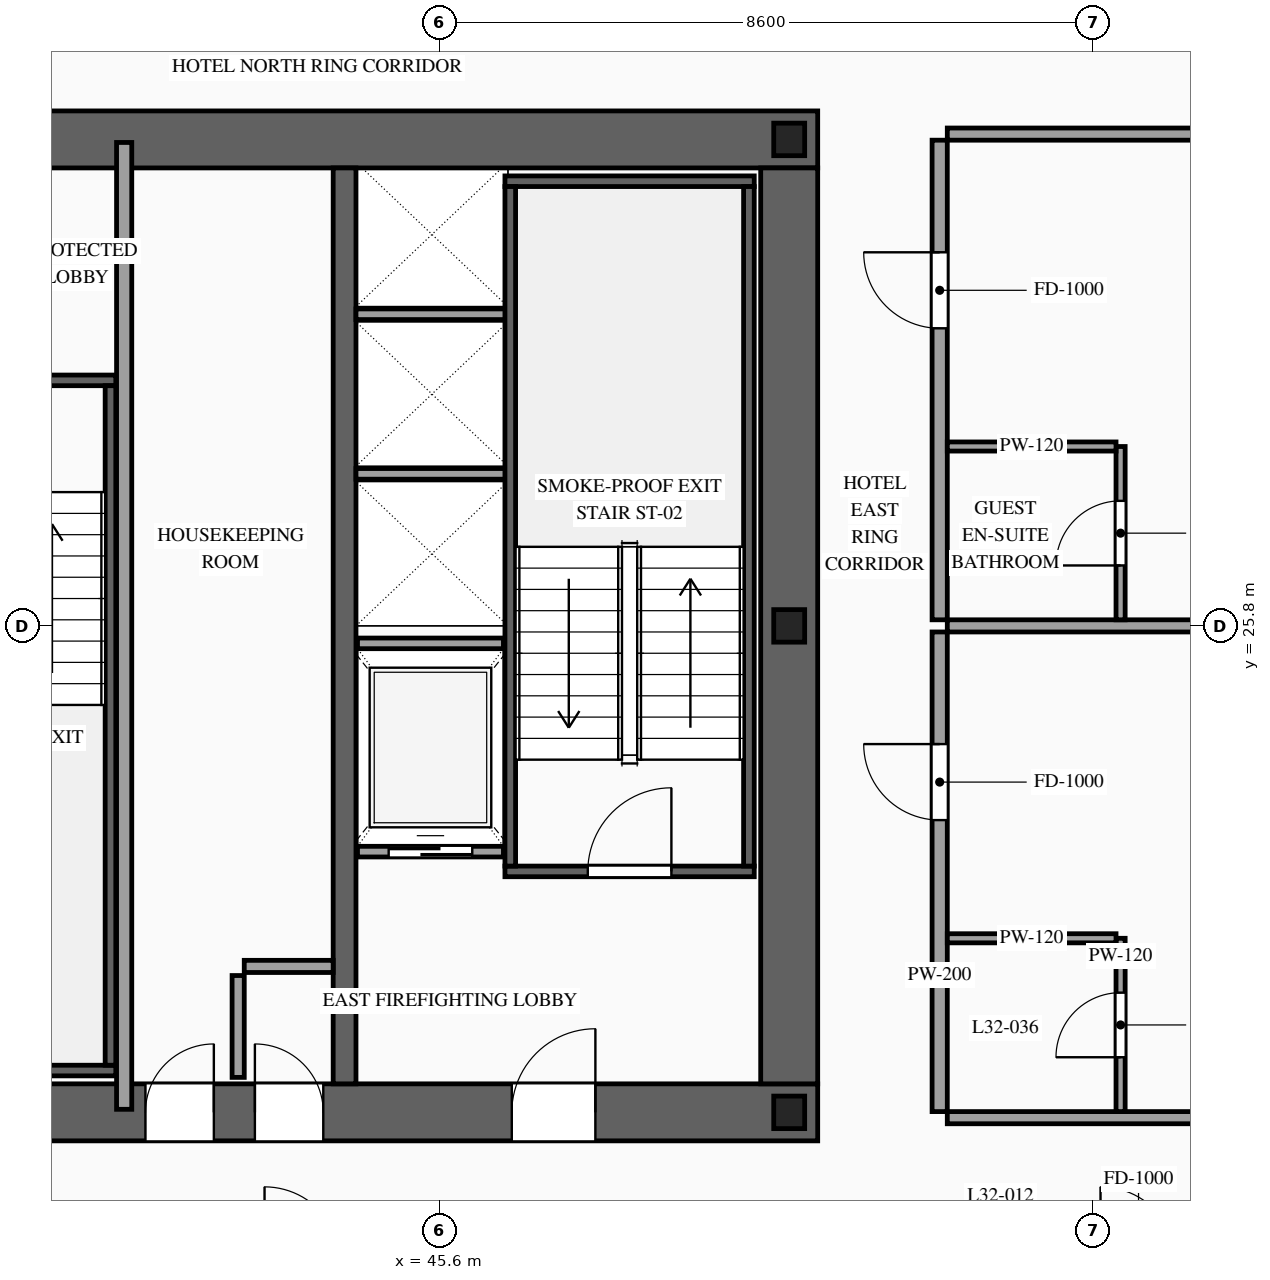
"""IFC4 building model, lengths in metres.
Left out: names, types, materials, properties, quantities, classifications, styles, units other than length and angle.
Written with IfcOpenShell. Run it as: python <this file> out.ifc"""

import sys

from ifc_helpers import new_model, si_unit, direction, frame, frame_2d, origin, origin_2d, place, context, subcontext, project, spatial, rectangle, i_section, extrude, source, transform, mapped, element, fill, save


model = new_model("IFC4")
c1 = context("Model", 3, precision=1e-05, world=origin(), true_north=direction((0.0, 1.0)))
c2 = subcontext(c1, "Body", "Model", "MODEL_VIEW")
j1 = project(units=[si_unit("LENGTHUNIT", "METRE"), si_unit("PLANEANGLEUNIT", "RADIAN")], contexts=[c1])
p1 = place(None, origin())
s1 = spatial("IfcSite", under=j1, at=p1, CompositionType="ELEMENT")
p2 = place(p1, origin())
s2 = spatial("IfcBuilding", under=s1, at=p2, CompositionType="ELEMENT")
p3 = place(p2, frame((0.0, 0.0, 122.6)))
s3 = spatial("IfcBuildingStorey", under=s2, at=p3, CompositionType="ELEMENT", Elevation=122.6)
p4 = place(p3, frame((23.425, 19.4, 0.0), z_axis=(0.0, 0.0, 1.0), x_axis=(1.0, 0.0, 0.0)))
e1 = element("IfcWall", 1, at=p4, inside=s3, PredefinedType="SHEAR", context=c2, shape_type="SweptSolid", body=[
    extrude(rectangle(XDim=27.15, YDim=0.75, at=frame_2d((13.575, 0.0))), origin(), (0.0, 0.0, 1.0), 3.6),
])
p5 = place(p4, frame((2.025, 0.0, 0.0)))
e2 = element("IfcOpeningElement", 2, at=p5, cuts=e1, PredefinedType="OPENING", context=c2, shape_type="SweptSolid", body=[
    extrude(rectangle(XDim=1.1, YDim=2.2, at=frame_2d((0.55, 1.1))), frame((0.0, 0.39, 0.0), z_axis=(0.0, -1.0, 0.0), x_axis=(1.0, 0.0, 0.0)), (0.0, 0.0, 1.0), 0.78),
])
p6 = place(p4, frame((9.925, 0.0, 0.0)))
e3 = element("IfcOpeningElement", 3, at=p6, cuts=e1, PredefinedType="OPENING", context=c2, shape_type="SweptSolid", body=[
    extrude(rectangle(XDim=1.1, YDim=2.2, at=frame_2d((0.55, 1.1))), frame((0.0, 0.39, 0.0), z_axis=(0.0, -1.0, 0.0), x_axis=(1.0, 0.0, 0.0)), (0.0, 0.0, 1.0), 0.78),
])
p7 = place(p4, frame((23.125, 0.0, 0.0)))
e4 = element("IfcOpeningElement", 4, at=p7, cuts=e1, PredefinedType="OPENING", context=c2, shape_type="SweptSolid", body=[
    extrude(rectangle(XDim=1.1, YDim=2.2, at=frame_2d((0.55, 1.1))), frame((0.0, 0.39, 0.0), z_axis=(0.0, -1.0, 0.0), x_axis=(1.0, 0.0, 0.0)), (0.0, 0.0, 1.0), 0.78),
])
p8 = place(p4, frame((19.745, 0.0, 0.0)))
e5 = element("IfcOpeningElement", 5, at=p8, cuts=e1, PredefinedType="OPENING", context=c2, shape_type="SweptSolid", body=[
    extrude(rectangle(XDim=0.9, YDim=2.15, at=frame_2d((0.45, 1.075))), frame((0.0, 0.39, 0.0), z_axis=(0.0, -1.0, 0.0), x_axis=(1.0, 0.0, 0.0)), (0.0, 0.0, 1.0), 0.78),
])
p9 = place(p4, frame((18.305, 0.0, 0.0)))
e6 = element("IfcOpeningElement", 6, at=p9, cuts=e1, PredefinedType="OPENING", context=c2, shape_type="SweptSolid", body=[
    extrude(rectangle(XDim=0.9, YDim=2.15, at=frame_2d((0.45, 1.075))), frame((0.0, 0.39, 0.0), z_axis=(0.0, -1.0, 0.0), x_axis=(1.0, 0.0, 0.0)), (0.0, 0.0, 1.0), 0.78),
])
p10 = place(p3, frame((23.425, 32.2, 0.0), z_axis=(0.0, 0.0, 1.0), x_axis=(1.0, 0.0, 0.0)))
e7 = element("IfcWall", 7, at=p10, inside=s3, PredefinedType="SHEAR", context=c2, shape_type="SweptSolid", body=[
    extrude(rectangle(XDim=27.15, YDim=0.75, at=frame_2d((13.575, 0.0))), origin(), (0.0, 0.0, 1.0), 3.6),
])
p11 = place(p10, frame((4.645, 0.0, 0.0)))
e8 = element("IfcOpeningElement", 8, at=p11, cuts=e7, PredefinedType="OPENING", context=c2, shape_type="SweptSolid", body=[
    extrude(rectangle(XDim=0.9, YDim=2.15, at=frame_2d((0.45, 1.075))), frame((0.0, 0.39, 0.0), z_axis=(0.0, -1.0, 0.0), x_axis=(1.0, 0.0, 0.0)), (0.0, 0.0, 1.0), 0.78),
])
p12 = place(p10, frame((9.925, 0.0, 0.0)))
e9 = element("IfcOpeningElement", 9, at=p12, cuts=e7, PredefinedType="OPENING", context=c2, shape_type="SweptSolid", body=[
    extrude(rectangle(XDim=1.1, YDim=2.2, at=frame_2d((0.55, 1.1))), frame((0.0, 0.39, 0.0), z_axis=(0.0, -1.0, 0.0), x_axis=(1.0, 0.0, 0.0)), (0.0, 0.0, 1.0), 0.78),
])
p13 = place(p10, frame((15.775, 0.0, 0.0)))
e10 = element("IfcOpeningElement", 10, at=p13, cuts=e7, PredefinedType="OPENING", context=c2, shape_type="SweptSolid", body=[
    extrude(rectangle(XDim=1.1, YDim=2.2, at=frame_2d((0.55, 1.1))), frame((0.0, 0.39, 0.0), z_axis=(0.0, -1.0, 0.0), x_axis=(1.0, 0.0, 0.0)), (0.0, 0.0, 1.0), 0.78),
])
m1 = source(origin(), c2, "Body", "SweptSolid", [
    extrude(rectangle(XDim=12.05, YDim=0.75, at=frame_2d((6.025, 0.0))), origin(), (0.0, 0.0, 1.0), 3.6),
])
p14 = place(p3, frame((50.2, 19.775, 0.0), z_axis=(0.0, 0.0, 1.0), x_axis=(0.0, 1.0, 0.0)))
e11 = element("IfcWall", 11, at=p14, inside=s3, PredefinedType="SHEAR", context=c2, shape_type="MappedRepresentation", body=[
    mapped(m1, transform((0.0, 0.0, 0.0), scale=1.0)),
])
m2 = source(origin(), c2, "Body", "SweptSolid", [
    extrude(rectangle(XDim=12.05, YDim=0.3, at=frame_2d((6.025, 0.0))), origin(), (0.0, 0.0, 1.0), 3.6),
])
p15 = place(p3, frame((44.35, 19.775, 0.0), z_axis=(0.0, 0.0, 1.0), x_axis=(0.0, 1.0, 0.0)))
e12 = element("IfcWall", 12, at=p15, inside=s3, PredefinedType="SOLIDWALL", context=c2, shape_type="MappedRepresentation", body=[
    mapped(m2, transform((0.0, 0.0, 0.0), scale=1.0)),
])
m3 = source(origin(), c2, "Body", "SweptSolid", [
    extrude(i_section(OverallWidth=0.407, OverallDepth=0.428, WebThickness=0.02, FlangeThickness=0.035, at=origin_2d()), origin(), (0.0, 0.0, 1.0), 3.6),
])
for number, where, z_axis, x_axis in (
    (13, (50.2, 19.4, 0.0), (0.0, 0.0, 1.0), (1.0, 0.0, 0.0)),
    (14, (50.2, 25.8, 0.0), (0.0, 0.0, 1.0), (1.0, 0.0, 0.0)),
    (15, (50.2, 32.2, 0.0), (0.0, 0.0, 1.0), (1.0, 0.0, 0.0)),
):
    element("IfcColumn", number, at=place(p3, frame(where, z_axis=z_axis, x_axis=x_axis)), inside=s3, PredefinedType="COLUMN", context=c2, shape_type="MappedRepresentation", body=[
        mapped(m3, transform((0.0, 0.0, 0.0), scale=1.0)),
    ])
p16 = place(p3, frame((44.52, 22.83, 0.0), z_axis=(0.0, 0.0, 1.0), x_axis=(1.0, 0.0, 0.0)))
e16 = element("IfcWall", 16, at=p16, inside=s3, PredefinedType="SOLIDWALL", context=c2, shape_type="SweptSolid", body=[
    extrude(rectangle(XDim=1.92, YDim=0.14, at=frame_2d((0.96, 0.0))), origin(), (0.0, 0.0, 1.0), 3.38),
])
p17 = place(p16, frame((0.41, 0.0, 0.0)))
e17 = element("IfcOpeningElement", 17, at=p17, cuts=e16, PredefinedType="OPENING", context=c2, shape_type="SweptSolid", body=[
    extrude(rectangle(XDim=1.1, YDim=2.2, at=frame_2d((0.55, 1.1))), frame((0.0, 0.085, 0.0), z_axis=(0.0, -1.0, 0.0), x_axis=(1.0, 0.0, 0.0)), (0.0, 0.0, 1.0), 0.17),
])
m4 = source(origin(), c2, "Body", "SweptSolid", [
    extrude(rectangle(XDim=1.92, YDim=0.14, at=frame_2d((0.96, 0.0))), origin(), (0.0, 0.0, 1.0), 3.38),
])
p18 = place(p3, frame((44.52, 25.57, 0.0), z_axis=(0.0, 0.0, 1.0), x_axis=(1.0, 0.0, 0.0)))
e18 = element("IfcWall", 18, at=p18, inside=s3, PredefinedType="SOLIDWALL", context=c2, shape_type="MappedRepresentation", body=[
    mapped(m4, transform((0.0, 0.0, 0.0), scale=1.0)),
])
m5 = source(origin(), c2, "Body", "SweptSolid", [
    extrude(rectangle(XDim=2.0, YDim=0.14, at=frame_2d((1.0, 0.0))), origin(), (0.0, 0.0, 1.0), 3.38),
])
for number, where, z_axis, x_axis in (
    (19, (44.5, 27.8, 0.0), (0.0, 0.0, 1.0), (1.0, 0.0, 0.0)),
    (20, (44.5, 29.9, 0.0), (0.0, 0.0, 1.0), (1.0, 0.0, 0.0)),
):
    element("IfcWall", number, at=place(p3, frame(where, z_axis=z_axis, x_axis=x_axis)), inside=s3, PredefinedType="SOLIDWALL", context=c2, shape_type="MappedRepresentation", body=[
        mapped(m5, transform((0.0, 0.0, 0.0), scale=1.0)),
    ])
p19 = place(p3, frame((46.46, 22.57, 0.0), z_axis=(0.0, 0.0, 1.0), x_axis=(1.0, 0.0, 0.0)))
e21 = element("IfcWall", 21, at=p19, inside=s3, PredefinedType="SOLIDWALL", context=c2, shape_type="SweptSolid", body=[
    extrude(rectangle(XDim=3.28, YDim=0.14, at=frame_2d((1.64, 0.0))), origin(), (0.0, 0.0, 1.0), 3.38),
])
p20 = place(p19, frame((1.09, 0.0, 0.0)))
e22 = element("IfcOpeningElement", 22, at=p20, cuts=e21, PredefinedType="OPENING", context=c2, shape_type="SweptSolid", body=[
    extrude(rectangle(XDim=1.1, YDim=2.2, at=frame_2d((0.55, 1.1))), frame((0.0, 0.085, 0.0), z_axis=(0.0, -1.0, 0.0), x_axis=(1.0, 0.0, 0.0)), (0.0, 0.0, 1.0), 0.17),
])
m6 = source(origin(), c2, "Body", "SweptSolid", [
    extrude(rectangle(XDim=3.28, YDim=0.14, at=frame_2d((1.64, 0.0))), origin(), (0.0, 0.0, 1.0), 3.38),
])
p21 = place(p3, frame((46.46, 31.65, 0.0), z_axis=(0.0, 0.0, 1.0), x_axis=(1.0, 0.0, 0.0)))
e23 = element("IfcWall", 23, at=p21, inside=s3, PredefinedType="SOLIDWALL", context=c2, shape_type="MappedRepresentation", body=[
    mapped(m6, transform((0.0, 0.0, 0.0), scale=1.0)),
])
m7 = source(origin(), c2, "Body", "SweptSolid", [
    extrude(rectangle(XDim=8.94, YDim=0.14, at=frame_2d((4.47, 0.0))), origin(), (0.0, 0.0, 1.0), 3.38),
])
for number, where, z_axis, x_axis in (
    (24, (46.53, 22.64, 0.0), (0.0, 0.0, 1.0), (0.0, 1.0, 0.0)),
    (25, (49.67, 22.64, 0.0), (0.0, 0.0, 1.0), (0.0, 1.0, 0.0)),
):
    element("IfcWall", number, at=place(p3, frame(where, z_axis=z_axis, x_axis=x_axis)), inside=s3, PredefinedType="SOLIDWALL", context=c2, shape_type="MappedRepresentation", body=[
        mapped(m7, transform((0.0, 0.0, 0.0), scale=1.0)),
    ])
p22 = place(p3, frame((38.2, 29.03, 0.0), z_axis=(0.0, 0.0, 1.0), x_axis=(1.0, 0.0, 0.0)))
e26 = element("IfcWall", 26, at=p22, inside=s3, PredefinedType="SOLIDWALL", context=c2, shape_type="SweptSolid", body=[
    extrude(rectangle(XDim=3.14, YDim=0.14, at=frame_2d((1.57, 0.0))), origin(), (0.0, 0.0, 1.0), 3.38),
])
p23 = place(p22, frame((1.02, 0.0, 0.0)))
e27 = element("IfcOpeningElement", 27, at=p23, cuts=e26, PredefinedType="OPENING", context=c2, shape_type="SweptSolid", body=[
    extrude(rectangle(XDim=1.1, YDim=2.2, at=frame_2d((0.55, 1.1))), frame((0.0, 0.085, 0.0), z_axis=(0.0, -1.0, 0.0), x_axis=(1.0, 0.0, 0.0)), (0.0, 0.0, 1.0), 0.17),
])
m8 = source(origin(), c2, "Body", "SweptSolid", [
    extrude(rectangle(XDim=3.14, YDim=0.14, at=frame_2d((1.57, 0.0))), origin(), (0.0, 0.0, 1.0), 3.38),
])
p24 = place(p3, frame((38.2, 19.95, 0.0), z_axis=(0.0, 0.0, 1.0), x_axis=(1.0, 0.0, 0.0)))
e28 = element("IfcWall", 28, at=p24, inside=s3, PredefinedType="SOLIDWALL", context=c2, shape_type="MappedRepresentation", body=[
    mapped(m8, transform((0.0, 0.0, 0.0), scale=1.0)),
])
m9 = source(origin(), c2, "Body", "SweptSolid", [
    extrude(rectangle(XDim=8.94, YDim=0.14, at=frame_2d((4.47, 0.0))), origin(), (0.0, 0.0, 1.0), 3.38),
])
p25 = place(p3, frame((41.27, 20.02, 0.0), z_axis=(0.0, 0.0, 1.0), x_axis=(0.0, 1.0, 0.0)))
e29 = element("IfcWall", 29, at=p25, inside=s3, PredefinedType="SOLIDWALL", context=c2, shape_type="MappedRepresentation", body=[
    mapped(m9, transform((0.0, 0.0, 0.0), scale=1.0)),
])
m10 = source(origin(), c2, "Body", "SweptSolid", [
    extrude(rectangle(XDim=1.34, YDim=0.16, at=frame_2d((0.67, 0.0))), origin(), (0.0, 0.0, 1.0), 3.38),
])
p26 = place(p3, frame((42.95, 19.86, 0.0), z_axis=(0.0, 0.0, 1.0), x_axis=(0.0, 1.0, 0.0)))
e30 = element("IfcWall", 30, at=p26, inside=s3, PredefinedType="PARTITIONING", context=c2, shape_type="MappedRepresentation", body=[
    mapped(m10, transform((0.0, 0.0, 0.0), scale=1.0)),
])
m11 = source(origin(), c2, "Body", "SweptSolid", [
    extrude(rectangle(XDim=1.17, YDim=0.16, at=frame_2d((0.585, 0.0))), origin(), (0.0, 0.0, 1.0), 3.38),
])
p27 = place(p3, frame((43.03, 21.32, 0.0), z_axis=(0.0, 0.0, 1.0), x_axis=(1.0, 0.0, 0.0)))
e31 = element("IfcWall", 31, at=p27, inside=s3, PredefinedType="PARTITIONING", context=c2, shape_type="MappedRepresentation", body=[
    mapped(m11, transform((0.0, 0.0, 0.0), scale=1.0)),
])
m12 = source(origin(), c2, "Body", "SweptSolid", [
    extrude(rectangle(XDim=12.72, YDim=0.2, at=frame_2d((6.36, 0.0))), origin(), (0.0, 0.0, 1.0), 3.38),
])
p28 = place(p3, frame((41.45, 19.44, 0.0), z_axis=(0.0, 0.0, 1.0), x_axis=(0.0, 1.0, 0.0)))
e32 = element("IfcWall", 32, at=p28, inside=s3, PredefinedType="PARTITIONING", context=c2, shape_type="MappedRepresentation", body=[
    mapped(m12, transform((0.0, 0.0, 0.0), scale=1.0)),
])
p29 = place(p3, frame((52.18, 19.41, 0.0), z_axis=(0.0, 0.0, 1.0), x_axis=(0.0, 1.0, 0.0)))
e33 = element("IfcWall", 33, at=p29, inside=s3, PredefinedType="PARTITIONING", context=c2, shape_type="SweptSolid", body=[
    extrude(rectangle(XDim=6.31, YDim=0.2, at=frame_2d((3.155, 0.0))), origin(), (0.0, 0.0, 1.0), 3.38),
])
p30 = place(p29, frame((3.835, 0.0, 0.0)))
e34 = element("IfcOpeningElement", 34, at=p30, cuts=e33, PredefinedType="OPENING", context=c2, shape_type="SweptSolid", body=[
    extrude(rectangle(XDim=1.0, YDim=2.2, at=frame_2d((0.5, 1.1))), frame((0.0, 0.115, 0.0), z_axis=(0.0, -1.0, 0.0), x_axis=(1.0, 0.0, 0.0)), (0.0, 0.0, 1.0), 0.23),
])
m13 = source(origin(), c2, "Body", "SweptSolid", [
    extrude(rectangle(XDim=8.17, YDim=0.16, at=frame_2d((4.085, 0.0))), origin(), (0.0, 0.0, 1.0), 2.675),
])
p31 = place(p3, frame((52.28, 25.8, 0.0), z_axis=(0.0, 0.0, 1.0), x_axis=(1.0, 0.0, 0.0)))
e35 = element("IfcWall", 35, at=p31, inside=s3, PredefinedType="PARTITIONING", context=c2, shape_type="MappedRepresentation", body=[
    mapped(m13, transform((0.0, 0.0, 0.0), scale=1.0)),
])
m14 = source(origin(), c2, "Body", "SweptSolid", [
    extrude(rectangle(XDim=8.17, YDim=0.16, at=frame_2d((4.085, 0.0))), origin(), (0.0, 0.0, 1.0), 2.875),
])
p32 = place(p3, frame((52.28, 19.33, 0.0), z_axis=(0.0, 0.0, 1.0), x_axis=(1.0, 0.0, 0.0)))
e36 = element("IfcWall", 36, at=p32, inside=s3, PredefinedType="PARTITIONING", context=c2, shape_type="MappedRepresentation", body=[
    mapped(m14, transform((0.0, 0.0, 0.0), scale=1.0)),
])
p33 = place(p3, frame((54.56, 19.41, 0.0), z_axis=(0.0, 0.0, 1.0), x_axis=(0.0, 1.0, 0.0)))
e37 = element("IfcWall", 37, at=p33, inside=s3, PredefinedType="PARTITIONING", context=c2, shape_type="SweptSolid", body=[
    extrude(rectangle(XDim=2.28, YDim=0.12, at=frame_2d((1.14, 0.0))), origin(), (0.0, 0.0, 1.0), 3.38),
])
p34 = place(p33, frame((0.715, 0.0, 0.0)))
e38 = element("IfcOpeningElement", 38, at=p34, cuts=e37, PredefinedType="OPENING", context=c2, shape_type="SweptSolid", body=[
    extrude(rectangle(XDim=0.85, YDim=2.1, at=frame_2d((0.425, 1.05))), frame((0.0, 0.075, 0.0), z_axis=(0.0, -1.0, 0.0), x_axis=(1.0, 0.0, 0.0)), (0.0, 0.0, 1.0), 0.15),
])
m15 = source(origin(), c2, "Body", "SweptSolid", [
    extrude(rectangle(XDim=2.22, YDim=0.12, at=frame_2d((1.11, 0.0))), origin(), (0.0, 0.0, 1.0), 3.38),
])
p35 = place(p3, frame((52.28, 21.69, 0.0), z_axis=(0.0, 0.0, 1.0), x_axis=(1.0, 0.0, 0.0)))
e39 = element("IfcWall", 39, at=p35, inside=s3, PredefinedType="PARTITIONING", context=c2, shape_type="MappedRepresentation", body=[
    mapped(m15, transform((0.0, 0.0, 0.0), scale=1.0)),
])
p36 = place(p3, frame((52.18, 25.88, 0.0), z_axis=(0.0, 0.0, 1.0), x_axis=(0.0, 1.0, 0.0)))
e40 = element("IfcWall", 40, at=p36, inside=s3, PredefinedType="PARTITIONING", context=c2, shape_type="SweptSolid", body=[
    extrude(rectangle(XDim=6.31, YDim=0.2, at=frame_2d((3.155, 0.0))), origin(), (0.0, 0.0, 1.0), 3.38),
])
p37 = place(p36, frame((3.835, 0.0, 0.0)))
e41 = element("IfcOpeningElement", 41, at=p37, cuts=e40, PredefinedType="OPENING", context=c2, shape_type="SweptSolid", body=[
    extrude(rectangle(XDim=1.0, YDim=2.2, at=frame_2d((0.5, 1.1))), frame((0.0, 0.115, 0.0), z_axis=(0.0, -1.0, 0.0), x_axis=(1.0, 0.0, 0.0)), (0.0, 0.0, 1.0), 0.23),
])
p38 = place(p3, frame((52.28, 32.27, 0.0), z_axis=(0.0, 0.0, 1.0), x_axis=(1.0, 0.0, 0.0)))
e42 = element("IfcWall", 42, at=p38, inside=s3, PredefinedType="PARTITIONING", context=c2, shape_type="MappedRepresentation", body=[
    mapped(m14, transform((0.0, 0.0, 0.0), scale=1.0)),
])
p39 = place(p3, frame((54.56, 25.88, 0.0), z_axis=(0.0, 0.0, 1.0), x_axis=(0.0, 1.0, 0.0)))
e43 = element("IfcWall", 43, at=p39, inside=s3, PredefinedType="PARTITIONING", context=c2, shape_type="SweptSolid", body=[
    extrude(rectangle(XDim=2.28, YDim=0.12, at=frame_2d((1.14, 0.0))), origin(), (0.0, 0.0, 1.0), 3.38),
])
p40 = place(p39, frame((0.715, 0.0, 0.0)))
e44 = element("IfcOpeningElement", 44, at=p40, cuts=e43, PredefinedType="OPENING", context=c2, shape_type="SweptSolid", body=[
    extrude(rectangle(XDim=0.85, YDim=2.1, at=frame_2d((0.425, 1.05))), frame((0.0, 0.075, 0.0), z_axis=(0.0, -1.0, 0.0), x_axis=(1.0, 0.0, 0.0)), (0.0, 0.0, 1.0), 0.15),
])
p41 = place(p3, frame((52.28, 28.16, 0.0), z_axis=(0.0, 0.0, 1.0), x_axis=(1.0, 0.0, 0.0)))
e45 = element("IfcWall", 45, at=p41, inside=s3, PredefinedType="PARTITIONING", context=c2, shape_type="MappedRepresentation", body=[
    mapped(m15, transform((0.0, 0.0, 0.0), scale=1.0)),
])
m16 = source(origin(), c2, "Body", "SweptSolid", [
    extrude(rectangle(XDim=1.1, YDim=2.2, at=frame_2d((0.55, 1.1))), frame((0.0, 0.025, 0.0), z_axis=(0.0, -1.0, 0.0), x_axis=(1.0, 0.0, 0.0)), (0.0, 0.0, 1.0), 0.05),
])
p42 = place(p17, origin())
e46 = element("IfcDoor", 46, at=p42, inside=s3, OperationType="SLIDING_TO_RIGHT", PredefinedType="DOOR", context=c2, shape_type="MappedRepresentation", body=[
    mapped(m16, transform((0.0, 0.0, 0.0), scale=1.0)),
])
fill(e17, e46)
m17 = source(origin(), c2, "Body", "SweptSolid", [
    extrude(rectangle(XDim=1.1, YDim=2.2, at=frame_2d((0.55, 1.1))), frame((0.0, 0.025, 0.0), z_axis=(0.0, -1.0, 0.0), x_axis=(1.0, 0.0, 0.0)), (0.0, 0.0, 1.0), 0.05),
])
p43 = place(p20, origin())
e47 = element("IfcDoor", 47, at=p43, inside=s3, OperationType="SINGLE_SWING_RIGHT", PredefinedType="DOOR", context=c2, shape_type="MappedRepresentation", body=[
    mapped(m17, transform((0.0, 0.0, 0.0), scale=1.0)),
])
fill(e22, e47)
p44 = place(p7, origin())
e48 = element("IfcDoor", 48, at=p44, inside=s3, OperationType="SINGLE_SWING_RIGHT", PredefinedType="DOOR", context=c2, shape_type="MappedRepresentation", body=[
    mapped(m17, transform((0.0, 0.0, 0.0), scale=1.0)),
])
fill(e4, e48)
m18 = source(origin(), c2, "Body", "SweptSolid", [
    extrude(rectangle(XDim=0.9, YDim=2.15, at=frame_2d((0.45, 1.075))), frame((0.0, 0.025, 0.0), z_axis=(0.0, -1.0, 0.0), x_axis=(1.0, 0.0, 0.0)), (0.0, 0.0, 1.0), 0.05),
])
p45 = place(p8, origin())
e49 = element("IfcDoor", 49, at=p45, inside=s3, OperationType="SINGLE_SWING_LEFT", PredefinedType="DOOR", context=c2, shape_type="MappedRepresentation", body=[
    mapped(m18, transform((0.0, 0.0, 0.0), scale=1.0)),
])
fill(e5, e49)
p46 = place(p9, origin())
e50 = element("IfcDoor", 50, at=p46, inside=s3, OperationType="SINGLE_SWING_RIGHT", PredefinedType="DOOR", context=c2, shape_type="MappedRepresentation", body=[
    mapped(m18, transform((0.0, 0.0, 0.0), scale=1.0)),
])
fill(e6, e50)
m19 = source(origin(), c2, "Body", "SweptSolid", [
    extrude(rectangle(XDim=1.0, YDim=2.2, at=frame_2d((0.5, 1.1))), frame((0.0, 0.025, 0.0), z_axis=(0.0, -1.0, 0.0), x_axis=(1.0, 0.0, 0.0)), (0.0, 0.0, 1.0), 0.05),
])
p47 = place(p30, origin())
e51 = element("IfcDoor", 51, at=p47, inside=s3, OperationType="SINGLE_SWING_RIGHT", PredefinedType="DOOR", context=c2, shape_type="MappedRepresentation", body=[
    mapped(m19, transform((0.0, 0.0, 0.0), scale=1.0)),
])
fill(e34, e51)
m20 = source(origin(), c2, "Body", "SweptSolid", [
    extrude(rectangle(XDim=0.85, YDim=2.1, at=frame_2d((0.425, 1.05))), frame((0.0, 0.025, 0.0), z_axis=(0.0, -1.0, 0.0), x_axis=(1.0, 0.0, 0.0)), (0.0, 0.0, 1.0), 0.05),
])
p48 = place(p34, origin())
e52 = element("IfcDoor", 52, at=p48, inside=s3, OperationType="SINGLE_SWING_LEFT", PredefinedType="DOOR", context=c2, shape_type="MappedRepresentation", body=[
    mapped(m20, transform((0.0, 0.0, 0.0), scale=1.0)),
])
fill(e38, e52)
p49 = place(p37, origin())
e53 = element("IfcDoor", 53, at=p49, inside=s3, OperationType="SINGLE_SWING_RIGHT", PredefinedType="DOOR", context=c2, shape_type="MappedRepresentation", body=[
    mapped(m19, transform((0.0, 0.0, 0.0), scale=1.0)),
])
fill(e41, e53)
p50 = place(p40, origin())
e54 = element("IfcDoor", 54, at=p50, inside=s3, OperationType="SINGLE_SWING_LEFT", PredefinedType="DOOR", context=c2, shape_type="MappedRepresentation", body=[
    mapped(m20, transform((0.0, 0.0, 0.0), scale=1.0)),
])
fill(e44, e54)
save(model, sys.argv[1])
